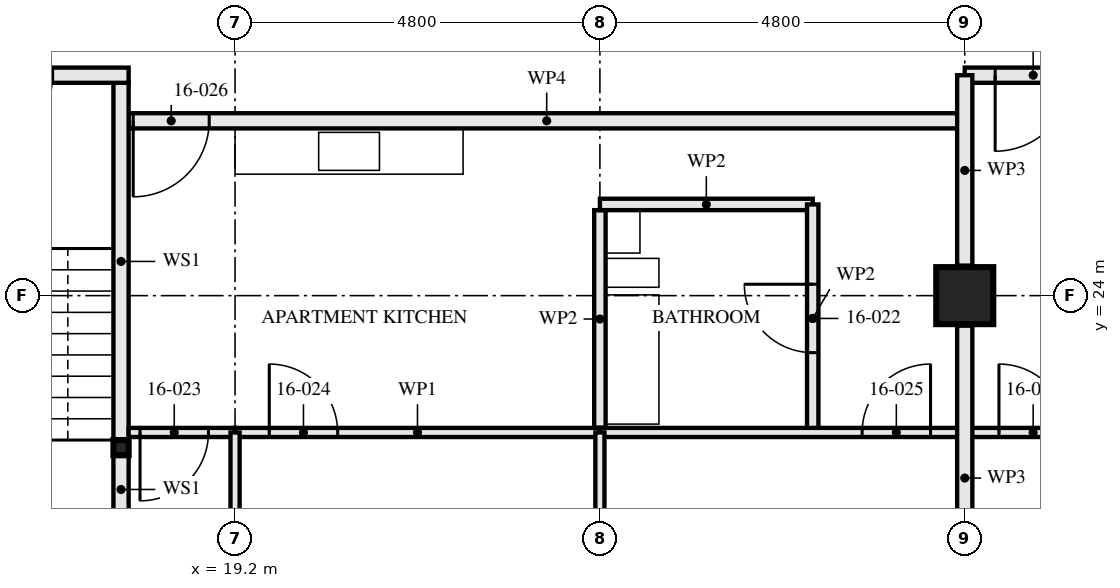
"""IFC4 building model, lengths in metres.
Left out: names, types, materials, properties, quantities, classifications, styles, units other than length and angle.
Written with IfcOpenShell. Run it as: python <this file> out.ifc"""

import sys

from ifc_helpers import new_model, si_unit, direction, frame, frame_2d, origin, origin_2d, place, context, subcontext, project, spatial, rectangle, hollow_rectangle, extrude, element, fill, save


model = new_model("IFC4")
c1 = context("Model", 3, precision=1e-05, world=origin(), true_north=direction((0.0, 1.0)))
c2 = subcontext(c1, "Body", "Model", "MODEL_VIEW")
j1 = project(units=[si_unit("LENGTHUNIT", "METRE"), si_unit("PLANEANGLEUNIT", "RADIAN")], contexts=[c1])
p1 = place(None, origin())
s1 = spatial("IfcSite", under=j1, at=p1, CompositionType="ELEMENT")
p2 = place(p1, origin())
s2 = spatial("IfcBuilding", under=s1, at=p2, CompositionType="ELEMENT")
p3 = place(p2, frame((0.0, 0.0, 62.0)))
s3 = spatial("IfcBuildingStorey", under=s2, at=p3, CompositionType="ELEMENT", Elevation=62.0)
p4 = place(p3, frame((28.8, 24.0, 0.0), z_axis=(0.0, 0.0, 1.0), x_axis=(1.0, 0.0, 0.0)))
e1 = element("IfcColumn", 1, at=p4, inside=s3, PredefinedType="COLUMN", context=c2, shape_type="SweptSolid", body=[
    extrude(hollow_rectangle(XDim=0.75, YDim=0.75, WallThickness=0.08, at=origin_2d()), origin(), (0.0, 0.0, 1.0), 3.5),
])
p5 = place(p3, frame((17.7, 22.0, 0.0), z_axis=(0.0, 0.0, 1.0), x_axis=(1.0, 0.0, 0.0)))
e2 = element("IfcColumn", 2, at=p5, inside=s3, PredefinedType="COLUMN", context=c2, shape_type="SweptSolid", body=[
    extrude(hollow_rectangle(XDim=0.2, YDim=0.2, WallThickness=0.008, at=origin_2d()), origin(), (0.0, 0.0, 1.0), 3.33),
])
p6 = place(p3, frame((17.7, 21.0, 0.0), z_axis=(0.0, 0.0, 1.0), x_axis=(0.0, 1.0, 0.0)))
e3 = element("IfcWall", 3, at=p6, inside=s3, PredefinedType="SOLIDWALL", context=c2, shape_type="SweptSolid", body=[
    extrude(rectangle(XDim=0.9, YDim=0.2, at=frame_2d((0.45, 0.0))), origin(), (0.0, 0.0, 1.0), 2.99),
])
p7 = place(p3, frame((17.7, 22.1, 0.0), z_axis=(0.0, 0.0, 1.0), x_axis=(0.0, 1.0, 0.0)))
e4 = element("IfcWall", 4, at=p7, inside=s3, PredefinedType="SOLIDWALL", context=c2, shape_type="SweptSolid", body=[
    extrude(rectangle(XDim=4.7, YDim=0.2, at=frame_2d((2.35, 0.0))), origin(), (0.0, 0.0, 1.0), 2.99),
])
p8 = place(p3, frame((14.4, 26.9, 0.0), z_axis=(0.0, 0.0, 1.0), x_axis=(1.0, 0.0, 0.0)))
e5 = element("IfcWall", 5, at=p8, inside=s3, PredefinedType="SOLIDWALL", context=c2, shape_type="SweptSolid", body=[
    extrude(rectangle(XDim=3.4, YDim=0.2, at=frame_2d((1.7, 0.0))), origin(), (0.0, 0.0, 1.0), 3.33),
])
p9 = place(p8, frame((1.4, 0.0, 0.0)))
e6 = element("IfcOpeningElement", 6, at=p9, cuts=e5, PredefinedType="OPENING", context=c2, shape_type="SweptSolid", body=[
    extrude(rectangle(XDim=1.0, YDim=2.1, at=frame_2d((0.5, 1.05))), frame((0.0, 0.111, 0.0), z_axis=(0.0, -1.0, 0.0), x_axis=(1.0, 0.0, 0.0)), (0.0, 0.0, 1.0), 0.221),
])
p10 = place(p3, frame((26.8, 22.2, 0.0), z_axis=(0.0, 0.0, 1.0), x_axis=(0.0, 1.0, 0.0)))
e7 = element("IfcWall", 7, at=p10, inside=s3, PredefinedType="PARTITIONING", context=c2, shape_type="SweptSolid", body=[
    extrude(rectangle(XDim=3.0, YDim=0.15, at=frame_2d((1.5, 0.0))), origin(), (0.0, 0.0, 1.0), 2.55),
])
p11 = place(p10, frame((1.05, 0.0, 0.0)))
e8 = element("IfcOpeningElement", 8, at=p11, cuts=e7, PredefinedType="OPENING", context=c2, shape_type="SweptSolid", body=[
    extrude(rectangle(XDim=0.9, YDim=2.1, at=frame_2d((0.45, 1.05))), frame((0.0, 0.085, 0.0), z_axis=(0.0, -1.0, 0.0), x_axis=(1.0, 0.0, 0.0)), (0.0, 0.0, 1.0), 0.171),
])
p12 = place(p3, frame((24.0, 25.2, 0.0), z_axis=(0.0, 0.0, 1.0), x_axis=(1.0, 0.0, 0.0)))
e9 = element("IfcWall", 9, at=p12, inside=s3, PredefinedType="PARTITIONING", context=c2, shape_type="SweptSolid", body=[
    extrude(rectangle(XDim=2.8, YDim=0.15, at=frame_2d((1.4, 0.0))), origin(), (0.0, 0.0, 1.0), 3.33),
])
p13 = place(p3, frame((17.8, 22.2, 0.0), z_axis=(0.0, 0.0, 1.0), x_axis=(1.0, 0.0, 0.0)))
e10 = element("IfcWall", 10, at=p13, inside=s3, PredefinedType="PARTITIONING", context=c2, shape_type="SweptSolid", body=[
    extrude(rectangle(XDim=1.4, YDim=0.12, at=frame_2d((0.7, 0.0))), origin(), (0.0, 0.0, 1.0), 3.33),
])
p14 = place(p13, frame((0.15, 0.0, 0.0)))
e11 = element("IfcOpeningElement", 11, at=p14, cuts=e10, PredefinedType="OPENING", context=c2, shape_type="SweptSolid", body=[
    extrude(rectangle(XDim=0.9, YDim=2.1, at=frame_2d((0.45, 1.05))), frame((0.0, 0.071, 0.0), z_axis=(0.0, -1.0, 0.0), x_axis=(1.0, 0.0, 0.0)), (0.0, 0.0, 1.0), 0.141),
])
p15 = place(p3, frame((19.2, 22.2, 0.0), z_axis=(0.0, 0.0, 1.0), x_axis=(1.0, 0.0, 0.0)))
e12 = element("IfcWall", 12, at=p15, inside=s3, PredefinedType="PARTITIONING", context=c2, shape_type="SweptSolid", body=[
    extrude(rectangle(XDim=4.8, YDim=0.12, at=frame_2d((2.4, 0.0))), origin(), (0.0, 0.0, 1.0), 3.33),
])
p16 = place(p15, frame((0.45, 0.0, 0.0)))
e13 = element("IfcOpeningElement", 13, at=p16, cuts=e12, PredefinedType="OPENING", context=c2, shape_type="SweptSolid", body=[
    extrude(rectangle(XDim=0.9, YDim=2.1, at=frame_2d((0.45, 1.05))), frame((0.0, 0.071, 0.0), z_axis=(0.0, -1.0, 0.0), x_axis=(1.0, 0.0, 0.0)), (0.0, 0.0, 1.0), 0.141),
])
p17 = place(p3, frame((24.0, 22.2, 0.0), z_axis=(0.0, 0.0, 1.0), x_axis=(1.0, 0.0, 0.0)))
e14 = element("IfcWall", 14, at=p17, inside=s3, PredefinedType="PARTITIONING", context=c2, shape_type="SweptSolid", body=[
    extrude(rectangle(XDim=4.8, YDim=0.12, at=frame_2d((2.4, 0.0))), origin(), (0.0, 0.0, 1.0), 3.33),
])
p18 = place(p17, frame((3.45, 0.0, 0.0)))
e15 = element("IfcOpeningElement", 15, at=p18, cuts=e14, PredefinedType="OPENING", context=c2, shape_type="SweptSolid", body=[
    extrude(rectangle(XDim=0.9, YDim=2.1, at=frame_2d((0.45, 1.05))), frame((0.0, 0.071, 0.0), z_axis=(0.0, -1.0, 0.0), x_axis=(1.0, 0.0, 0.0)), (0.0, 0.0, 1.0), 0.141),
])
for number, where, z_axis, x_axis in (
    (16, (19.2, 14.795, 0.0), (0.0, 0.0, 1.0), (0.0, 1.0, 0.0)),
    (17, (24.0, 14.795, 0.0), (0.0, 0.0, 1.0), (0.0, 1.0, 0.0)),
):
    element("IfcWall", number, at=place(p3, frame(where, z_axis=z_axis, x_axis=x_axis)), inside=s3, PredefinedType="PARTITIONING", context=c2, shape_type="SweptSolid", body=[
        extrude(rectangle(XDim=7.405, YDim=0.12, at=frame_2d((3.703, 0.0))), origin(), (0.0, 0.0, 1.0), 2.55),
    ])
p19 = place(p3, frame((17.8, 26.3, 0.0), z_axis=(0.0, 0.0, 1.0), x_axis=(1.0, 0.0, 0.0)))
e18 = element("IfcWall", 18, at=p19, inside=s3, PredefinedType="PARTITIONING", context=c2, shape_type="SweptSolid", body=[
    extrude(rectangle(XDim=11.0, YDim=0.2, at=frame_2d((5.5, 0.0))), origin(), (0.0, 0.0, 1.0), 2.55),
])
p20 = place(p19, frame((0.06, 0.0, 0.0)))
e19 = element("IfcOpeningElement", 19, at=p20, cuts=e18, PredefinedType="OPENING", context=c2, shape_type="SweptSolid", body=[
    extrude(rectangle(XDim=1.0, YDim=2.1, at=frame_2d((0.5, 1.05))), frame((0.0, 0.111, 0.0), z_axis=(0.0, -1.0, 0.0), x_axis=(1.0, 0.0, 0.0)), (0.0, 0.0, 1.0), 0.221),
])
p21 = place(p3, frame((28.8, 22.2, 0.0), z_axis=(0.0, 0.0, 1.0), x_axis=(1.0, 0.0, 0.0)))
e20 = element("IfcWall", 20, at=p21, inside=s3, PredefinedType="PARTITIONING", context=c2, shape_type="SweptSolid", body=[
    extrude(rectangle(XDim=4.8, YDim=0.12, at=frame_2d((2.4, 0.0))), origin(), (0.0, 0.0, 1.0), 3.33),
])
p22 = place(p21, frame((0.45, 0.0, 0.0)))
e21 = element("IfcOpeningElement", 21, at=p22, cuts=e20, PredefinedType="OPENING", context=c2, shape_type="SweptSolid", body=[
    extrude(rectangle(XDim=0.9, YDim=2.1, at=frame_2d((0.45, 1.05))), frame((0.0, 0.071, 0.0), z_axis=(0.0, -1.0, 0.0), x_axis=(1.0, 0.0, 0.0)), (0.0, 0.0, 1.0), 0.141),
])
p23 = place(p3, frame((28.8, 26.9, 0.0), z_axis=(0.0, 0.0, 1.0), x_axis=(1.0, 0.0, 0.0)))
e22 = element("IfcWall", 22, at=p23, inside=s3, PredefinedType="PARTITIONING", context=c2, shape_type="SweptSolid", body=[
    extrude(rectangle(XDim=9.6, YDim=0.2, at=frame_2d((4.8, 0.0))), origin(), (0.0, 0.0, 1.0), 3.33),
])
p24 = place(p23, frame((0.4, 0.0, 0.0)))
e23 = element("IfcOpeningElement", 23, at=p24, cuts=e22, PredefinedType="OPENING", context=c2, shape_type="SweptSolid", body=[
    extrude(rectangle(XDim=1.0, YDim=2.1, at=frame_2d((0.5, 1.05))), frame((0.0, 0.111, 0.0), z_axis=(0.0, -1.0, 0.0), x_axis=(1.0, 0.0, 0.0)), (0.0, 0.0, 1.0), 0.221),
])
p25 = place(p3, frame((28.8, 19.595, 0.0), z_axis=(0.0, 0.0, 1.0), x_axis=(0.0, 1.0, 0.0)))
e24 = element("IfcWall", 24, at=p25, inside=s3, PredefinedType="PARTITIONING", context=c2, shape_type="SweptSolid", body=[
    extrude(rectangle(XDim=4.01, YDim=0.2, at=frame_2d((2.005, 0.0))), origin(), (0.0, 0.0, 1.0), 2.32),
])
p26 = place(p3, frame((28.8, 24.395, 0.0), z_axis=(0.0, 0.0, 1.0), x_axis=(0.0, 1.0, 0.0)))
e25 = element("IfcWall", 25, at=p26, inside=s3, PredefinedType="PARTITIONING", context=c2, shape_type="SweptSolid", body=[
    extrude(rectangle(XDim=2.505, YDim=0.2, at=frame_2d((1.252, 0.0))), origin(), (0.0, 0.0, 1.0), 2.32),
])
p27 = place(p3, frame((24.0, 22.26, 0.0), z_axis=(0.0, 0.0, 1.0), x_axis=(0.0, 1.0, 0.0)))
e26 = element("IfcWall", 26, at=p27, inside=s3, PredefinedType="PARTITIONING", context=c2, shape_type="SweptSolid", body=[
    extrude(rectangle(XDim=2.865, YDim=0.15, at=frame_2d((1.433, 0.0))), origin(), (0.0, 0.0, 1.0), 2.55),
])
p28 = place(p11, origin())
e27 = element("IfcDoor", 27, at=p28, inside=s3, OperationType="SINGLE_SWING_LEFT", PredefinedType="DOOR", context=c2, shape_type="SweptSolid", body=[
    extrude(rectangle(XDim=0.9, YDim=2.1, at=frame_2d((0.45, 1.05))), frame((0.0, 0.022, 0.0), z_axis=(0.0, -1.0, 0.0), x_axis=(1.0, 0.0, 0.0)), (0.0, 0.0, 1.0), 0.044),
])
fill(e8, e27)
p29 = place(p14, frame((0.9, 0.0, 0.0), z_axis=(0.0, 0.0, 1.0), x_axis=(-1.0, 0.0, 0.0)))
e28 = element("IfcDoor", 28, at=p29, inside=s3, OperationType="SINGLE_SWING_LEFT", PredefinedType="DOOR", context=c2, shape_type="SweptSolid", body=[
    extrude(rectangle(XDim=0.9, YDim=2.1, at=frame_2d((0.45, 1.05))), frame((0.0, 0.022, 0.0), z_axis=(0.0, -1.0, 0.0), x_axis=(1.0, 0.0, 0.0)), (0.0, 0.0, 1.0), 0.044),
])
fill(e11, e28)
p30 = place(p16, origin())
e29 = element("IfcDoor", 29, at=p30, inside=s3, OperationType="SINGLE_SWING_RIGHT", PredefinedType="DOOR", context=c2, shape_type="SweptSolid", body=[
    extrude(rectangle(XDim=0.9, YDim=2.1, at=frame_2d((0.45, 1.05))), frame((0.0, 0.022, 0.0), z_axis=(0.0, -1.0, 0.0), x_axis=(1.0, 0.0, 0.0)), (0.0, 0.0, 1.0), 0.044),
])
fill(e13, e29)
p31 = place(p18, origin())
e30 = element("IfcDoor", 30, at=p31, inside=s3, OperationType="SINGLE_SWING_LEFT", PredefinedType="DOOR", context=c2, shape_type="SweptSolid", body=[
    extrude(rectangle(XDim=0.9, YDim=2.1, at=frame_2d((0.45, 1.05))), frame((0.0, 0.022, 0.0), z_axis=(0.0, -1.0, 0.0), x_axis=(1.0, 0.0, 0.0)), (0.0, 0.0, 1.0), 0.044),
])
fill(e15, e30)
p32 = place(p20, frame((1.0, 0.0, 0.0), z_axis=(0.0, 0.0, 1.0), x_axis=(-1.0, 0.0, 0.0)))
e31 = element("IfcDoor", 31, at=p32, inside=s3, OperationType="SINGLE_SWING_LEFT", PredefinedType="DOOR", context=c2, shape_type="SweptSolid", body=[
    extrude(rectangle(XDim=1.0, YDim=2.1, at=frame_2d((0.5, 1.05))), frame((0.0, 0.027, 0.0), z_axis=(0.0, -1.0, 0.0), x_axis=(1.0, 0.0, 0.0)), (0.0, 0.0, 1.0), 0.054),
])
fill(e19, e31)
p33 = place(p22, origin())
e32 = element("IfcDoor", 32, at=p33, inside=s3, OperationType="SINGLE_SWING_RIGHT", PredefinedType="DOOR", context=c2, shape_type="SweptSolid", body=[
    extrude(rectangle(XDim=0.9, YDim=2.1, at=frame_2d((0.45, 1.05))), frame((0.0, 0.022, 0.0), z_axis=(0.0, -1.0, 0.0), x_axis=(1.0, 0.0, 0.0)), (0.0, 0.0, 1.0), 0.044),
])
fill(e21, e32)
p34 = place(p24, frame((1.0, 0.0, 0.0), z_axis=(0.0, 0.0, 1.0), x_axis=(-1.0, 0.0, 0.0)))
e33 = element("IfcDoor", 33, at=p34, inside=s3, OperationType="SINGLE_SWING_LEFT", PredefinedType="DOOR", context=c2, shape_type="SweptSolid", body=[
    extrude(rectangle(XDim=1.0, YDim=2.1, at=frame_2d((0.5, 1.05))), frame((0.0, 0.027, 0.0), z_axis=(0.0, -1.0, 0.0), x_axis=(1.0, 0.0, 0.0)), (0.0, 0.0, 1.0), 0.054),
])
fill(e23, e33)
save(model, sys.argv[1])
